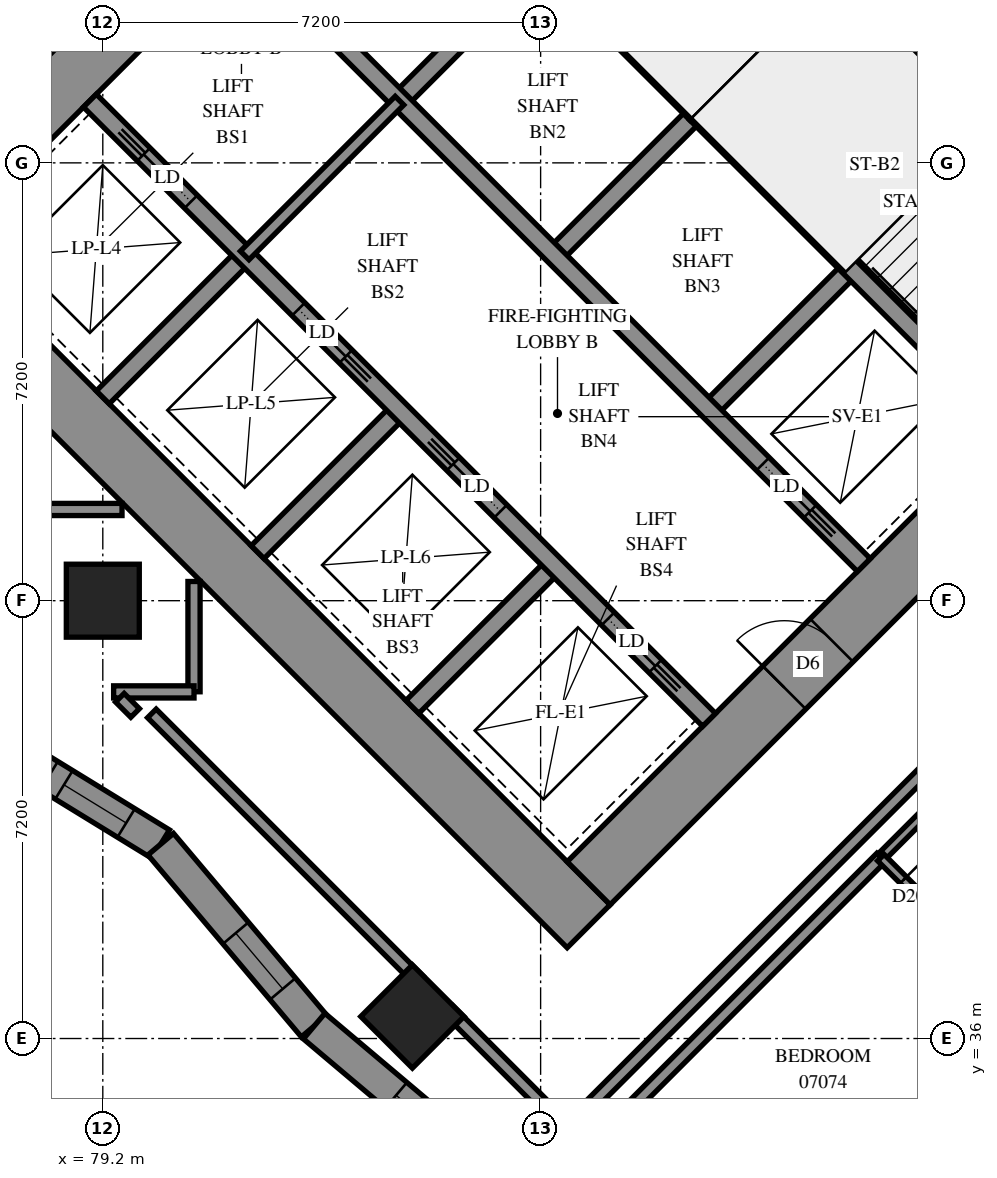
"""IFC4 building model, lengths in metres.
Left out: names, types, materials, properties, quantities, classifications, styles, units other than length and angle.
Written with IfcOpenShell. Run it as: python <this file> out.ifc"""

import sys

from ifc_helpers import new_model, si_unit, direction, frame, frame_2d, origin, origin_2d, place, context, subcontext, project, spatial, polyline, rectangle, outline, extrude, element, fill, save


model = new_model("IFC4")
c1 = context("Model", 3, precision=1e-05, world=origin(), true_north=direction((0.0, 1.0)))
c2 = subcontext(c1, "Body", "Model", "MODEL_VIEW")
j1 = project(units=[si_unit("LENGTHUNIT", "METRE"), si_unit("PLANEANGLEUNIT", "RADIAN")], contexts=[c1])
p1 = place(None, origin())
s1 = spatial("IfcSite", under=j1, at=p1, CompositionType="ELEMENT")
p2 = place(p1, origin())
s2 = spatial("IfcBuilding", under=s1, at=p2, CompositionType="ELEMENT")
p3 = place(p2, frame((0.0, 0.0, 30.4)))
s3 = spatial("IfcBuildingStorey", under=s2, at=p3, CompositionType="ELEMENT", Elevation=30.4)
for number, where, z_axis, x_axis in (
    (1, (79.2, 43.2, 0.0), (0.0, 0.0, 1.0), (1.0, 0.0, 0.0)),
    (2, (84.291, 36.362, 0.0), (0.0, 0.0, 1.0), (0.707, -0.707, 0.0)),
):
    element("IfcColumn", number, at=place(p3, frame(where, z_axis=z_axis, x_axis=x_axis)), inside=s3, PredefinedType="COLUMN", context=c2, shape_type="SweptSolid", body=[
        extrude(rectangle(XDim=1.2, YDim=1.2, at=origin_2d()), origin(), (0.0, 0.0, 1.0), 3.1),
    ])
p4 = place(p3, frame((75.594, 49.443, -0.3), z_axis=(0.0, 0.0, 1.0), x_axis=(0.7071037324, -0.70710983, 0.0)))
e3 = element("IfcWall", 3, at=p4, inside=s3, PredefinedType="SHEAR", context=c2, shape_type="SweptSolid", body=[
    extrude(rectangle(XDim=16.4, YDim=1.0, at=frame_2d((8.2, 0.0))), origin(), (0.0, 0.0, 1.0), 2.7),
])
p5 = place(p3, frame((86.483, 60.333, -0.3), z_axis=(0.0, 0.0, 1.0), x_axis=(0.70710983, -0.7071037324, 0.0)))
e4 = element("IfcWall", 4, at=p5, inside=s3, PredefinedType="SHEAR", context=c2, shape_type="SweptSolid", body=[
    extrude(rectangle(XDim=16.4, YDim=1.0, at=frame_2d((8.2, 0.0))), origin(), (0.0, 0.0, 1.0), 2.7),
])
p6 = place(p5, frame((11.0, 0.0, 0.3)))
e5 = element("IfcOpeningElement", 5, at=p6, cuts=e4, PredefinedType="OPENING", context=c2, shape_type="SweptSolid", body=[
    extrude(rectangle(XDim=0.8, YDim=2.1, at=frame_2d((0.4, 1.05))), frame((0.0, 0.51, 0.0), z_axis=(0.0, -1.0, 0.0), x_axis=(1.0, 0.0, 0.0)), (0.0, 0.0, 1.0), 1.02),
])
p7 = place(p3, frame((76.301, 49.443, -0.3), z_axis=(0.0, 0.0, 1.0), x_axis=(0.7071067812, 0.7071067812, 0.0)))
e6 = element("IfcWall", 6, at=p7, inside=s3, PredefinedType="SHEAR", context=c2, shape_type="SweptSolid", body=[
    extrude(rectangle(XDim=14.4, YDim=1.0, at=frame_2d((7.2, 0.0))), origin(), (0.0, 0.0, 1.0), 2.7),
])
p8 = place(p7, frame((4.55, 0.0, 0.3)))
e7 = element("IfcOpeningElement", 7, at=p8, cuts=e6, PredefinedType="OPENING", context=c2, shape_type="SweptSolid", body=[
    extrude(rectangle(XDim=1.1, YDim=2.1, at=frame_2d((0.55, 1.05))), frame((0.0, 0.51, 0.0), z_axis=(0.0, -1.0, 0.0), x_axis=(1.0, 0.0, 0.0)), (0.0, 0.0, 1.0), 1.02),
])
p9 = place(p7, frame((11.35, 0.0, 0.3)))
e8 = element("IfcOpeningElement", 8, at=p9, cuts=e6, PredefinedType="OPENING", context=c2, shape_type="SweptSolid", body=[
    extrude(rectangle(XDim=1.1, YDim=2.1, at=frame_2d((0.55, 1.05))), frame((0.0, 0.51, 0.0), z_axis=(0.0, -1.0, 0.0), x_axis=(1.0, 0.0, 0.0)), (0.0, 0.0, 1.0), 1.02),
])
p10 = place(p3, frame((87.19, 38.554, -0.3), z_axis=(0.0, 0.0, 1.0), x_axis=(0.707103309, 0.7071102534, 0.0)))
e9 = element("IfcWall", 9, at=p10, inside=s3, PredefinedType="SHEAR", context=c2, shape_type="SweptSolid", body=[
    extrude(rectangle(XDim=14.4, YDim=1.0, at=frame_2d((7.2, 0.0))), origin(), (0.0, 0.0, 1.0), 2.7),
])
p11 = place(p10, frame((4.55, 0.0, 0.3)))
e10 = element("IfcOpeningElement", 10, at=p11, cuts=e9, PredefinedType="OPENING", context=c2, shape_type="SweptSolid", body=[
    extrude(rectangle(XDim=1.1, YDim=2.1, at=frame_2d((0.55, 1.05))), frame((0.0, 0.51, 0.0), z_axis=(0.0, -1.0, 0.0), x_axis=(1.0, 0.0, 0.0)), (0.0, 0.0, 1.0), 1.02),
])
p12 = place(p10, frame((11.35, 0.0, 0.3)))
e11 = element("IfcOpeningElement", 11, at=p12, cuts=e9, PredefinedType="OPENING", context=c2, shape_type="SweptSolid", body=[
    extrude(rectangle(XDim=1.1, YDim=2.1, at=frame_2d((0.55, 1.05))), frame((0.0, 0.51, 0.0), z_axis=(0.0, -1.0, 0.0), x_axis=(1.0, 0.0, 0.0)), (0.0, 0.0, 1.0), 1.02),
])
for number, where, z_axis, x_axis in (
    (12, (79.2, 46.544, 0.0), (0.0, 0.0, 1.0), (0.707, 0.707, 0.0)),
    (13, (84.079, 51.423, 0.0), (0.0, 0.0, 1.0), (0.707, 0.707, 0.0)),
):
    element("IfcWall", number, at=place(p3, frame(where, z_axis=z_axis, x_axis=x_axis)), inside=s3, PredefinedType="SOLIDWALL", context=c2, shape_type="SweptSolid", body=[
        extrude(rectangle(XDim=3.3, YDim=0.3, at=frame_2d((1.65, 0.0))), origin(), (0.0, 0.0, 1.0), 3.1),
    ])
p13 = place(p3, frame((81.746, 43.999, 0.0), z_axis=(0.0, 0.0, 1.0), x_axis=(0.7071067812, 0.7071067812, 0.0)))
e14 = element("IfcWall", 14, at=p13, inside=s3, PredefinedType="SOLIDWALL", context=c2, shape_type="SweptSolid", body=[
    extrude(rectangle(XDim=3.3, YDim=0.3, at=frame_2d((1.65, 0.0))), origin(), (0.0, 0.0, 1.0), 3.1),
])
p14 = place(p3, frame((86.625, 48.878, 0.0), z_axis=(0.0, 0.0, 1.0), x_axis=(0.7071067812, 0.7071067812, 0.0)))
e15 = element("IfcWall", 15, at=p14, inside=s3, PredefinedType="SOLIDWALL", context=c2, shape_type="SweptSolid", body=[
    extrude(rectangle(XDim=3.3, YDim=0.3, at=frame_2d((1.65, 0.0))), origin(), (0.0, 0.0, 1.0), 3.1),
])
p15 = place(p3, frame((84.291, 41.453, 0.0), z_axis=(0.0, 0.0, 1.0), x_axis=(0.7071067812, 0.7071067812, 0.0)))
e16 = element("IfcWall", 16, at=p15, inside=s3, PredefinedType="SOLIDWALL", context=c2, shape_type="SweptSolid", body=[
    extrude(rectangle(XDim=3.3, YDim=0.3, at=frame_2d((1.65, 0.0))), origin(), (0.0, 0.0, 1.0), 3.1),
])
p16 = place(p3, frame((89.17, 46.332, 0.0), z_axis=(0.0, 0.0, 1.0), x_axis=(0.7071067812, 0.7071067812, 0.0)))
e17 = element("IfcWall", 17, at=p16, inside=s3, PredefinedType="SOLIDWALL", context=c2, shape_type="SweptSolid", body=[
    extrude(rectangle(XDim=3.3, YDim=0.3, at=frame_2d((1.65, 0.0))), origin(), (0.0, 0.0, 1.0), 3.1),
])
p17 = place(p3, frame((78.988, 51.423, 0.0), z_axis=(0.0, 0.0, 1.0), x_axis=(0.7071067812, -0.7071067812, 0.0)))
e18 = element("IfcWall", 18, at=p17, inside=s3, PredefinedType="SOLIDWALL", context=c2, shape_type="SweptSolid", body=[
    extrude(rectangle(XDim=14.4, YDim=0.3, at=frame_2d((7.2, 0.0))), origin(), (0.0, 0.0, 1.0), 3.1),
])
p18 = place(p17, frame((1.25, 0.0, 0.0)))
e19 = element("IfcOpeningElement", 19, at=p18, cuts=e18, PredefinedType="OPENING", context=c2, shape_type="SweptSolid", body=[
    extrude(rectangle(XDim=1.1, YDim=2.1, at=frame_2d((0.55, 1.05))), frame((0.0, 0.16, 0.0), z_axis=(0.0, -1.0, 0.0), x_axis=(1.0, 0.0, 0.0)), (0.0, 0.0, 1.0), 0.32),
])
p19 = place(p17, frame((4.85, 0.0, 0.0)))
e20 = element("IfcOpeningElement", 20, at=p19, cuts=e18, PredefinedType="OPENING", context=c2, shape_type="SweptSolid", body=[
    extrude(rectangle(XDim=1.1, YDim=2.1, at=frame_2d((0.55, 1.05))), frame((0.0, 0.16, 0.0), z_axis=(0.0, -1.0, 0.0), x_axis=(1.0, 0.0, 0.0)), (0.0, 0.0, 1.0), 0.32),
])
p20 = place(p17, frame((8.45, 0.0, 0.0)))
e21 = element("IfcOpeningElement", 21, at=p20, cuts=e18, PredefinedType="OPENING", context=c2, shape_type="SweptSolid", body=[
    extrude(rectangle(XDim=1.1, YDim=2.1, at=frame_2d((0.55, 1.05))), frame((0.0, 0.16, 0.0), z_axis=(0.0, -1.0, 0.0), x_axis=(1.0, 0.0, 0.0)), (0.0, 0.0, 1.0), 0.32),
])
p21 = place(p17, frame((12.05, 0.0, 0.0)))
e22 = element("IfcOpeningElement", 22, at=p21, cuts=e18, PredefinedType="OPENING", context=c2, shape_type="SweptSolid", body=[
    extrude(rectangle(XDim=1.1, YDim=2.1, at=frame_2d((0.55, 1.05))), frame((0.0, 0.16, 0.0), z_axis=(0.0, -1.0, 0.0), x_axis=(1.0, 0.0, 0.0)), (0.0, 0.0, 1.0), 0.32),
])
p22 = place(p3, frame((81.534, 53.969, 0.0), z_axis=(0.0, 0.0, 1.0), x_axis=(0.707103309, -0.7071102534, 0.0)))
e23 = element("IfcWall", 23, at=p22, inside=s3, PredefinedType="SOLIDWALL", context=c2, shape_type="SweptSolid", body=[
    extrude(rectangle(XDim=14.4, YDim=0.3, at=frame_2d((7.2, 0.0))), origin(), (0.0, 0.0, 1.0), 3.1),
])
p23 = place(p22, frame((12.05, 0.0, 0.0)))
e24 = element("IfcOpeningElement", 24, at=p23, cuts=e23, PredefinedType="OPENING", context=c2, shape_type="SweptSolid", body=[
    extrude(rectangle(XDim=1.1, YDim=2.1, at=frame_2d((0.55, 1.05))), frame((0.0, 0.16, 0.0), z_axis=(0.0, -1.0, 0.0), x_axis=(1.0, 0.0, 0.0)), (0.0, 0.0, 1.0), 0.32),
])
for number, where, z_axis, x_axis in (
    (25, (83.867, 56.302, 0.0), (0.0, 0.0, 1.0), (0.707, -0.707, 0.0)),
    (26, (88.958, 51.211, 0.0), (0.0, 0.0, 1.0), (0.707, -0.707, 0.0)),
):
    element("IfcWall", number, at=place(p3, frame(where, z_axis=z_axis, x_axis=x_axis)), inside=s3, PredefinedType="SOLIDWALL", context=c2, shape_type="SweptSolid", body=[
        extrude(rectangle(XDim=7.2, YDim=0.3, at=frame_2d((3.6, 0.0))), origin(), (0.0, 0.0, 1.0), 3.1),
    ])
p24 = place(p3, frame((88.958, 51.211, 0.0), z_axis=(0.0, 0.0, 1.0), x_axis=(0.7071067812, 0.7071067812, 0.0)))
e27 = element("IfcWall", 27, at=p24, inside=s3, PredefinedType="SOLIDWALL", context=c2, shape_type="SweptSolid", body=[
    extrude(rectangle(XDim=4.2, YDim=0.3, at=frame_2d((2.1, 0.0))), origin(), (0.0, 0.0, 1.0), 3.1),
])
p25 = place(p3, frame((76.681, 41.325, 0.0), z_axis=(0.0, 0.0, 1.0), x_axis=(0.852496072, -0.5227336293, 0.0)))
e28 = element("IfcWall", 28, at=p25, inside=s3, PredefinedType="SOLIDWALL", context=c2, shape_type="SweptSolid", body=[
    extrude(outline(polyline([(0.039, -0.275), (4.028, -0.275), (4.117, 0.275), (-0.039, 0.275), (0.039, -0.275)])), origin(), (0.0, 0.0, 1.0), 3.1),
])
p26 = place(p25, frame((0.719, 0.0, 0.5)))
e29 = element("IfcOpeningElement", 29, at=p26, cuts=e28, PredefinedType="OPENING", context=c2, shape_type="SweptSolid", body=[
    extrude(rectangle(XDim=1.2, YDim=2.45, at=frame_2d((0.6, 1.225))), frame((0.0, 0.285, 0.0), z_axis=(0.0, -1.0, 0.0), x_axis=(1.0, 0.0, 0.0)), (0.0, 0.0, 1.0), 0.57),
])
p27 = place(p25, frame((2.206, 0.0, 0.5)))
e30 = element("IfcOpeningElement", 30, at=p27, cuts=e28, PredefinedType="OPENING", context=c2, shape_type="SweptSolid", body=[
    extrude(rectangle(XDim=1.2, YDim=2.45, at=frame_2d((0.6, 1.225))), frame((0.0, 0.285, 0.0), z_axis=(0.0, -1.0, 0.0), x_axis=(1.0, 0.0, 0.0)), (0.0, 0.0, 1.0), 0.57),
])
p28 = place(p3, frame((80.153, 39.196, 0.0), z_axis=(0.0, 0.0, 1.0), x_axis=(0.6446069156, -0.7645141753, 0.0)))
e31 = element("IfcWall", 31, at=p28, inside=s3, PredefinedType="SOLIDWALL", context=c2, shape_type="SweptSolid", body=[
    extrude(outline(polyline([(0.044, -0.275), (3.937, -0.275), (3.89, 0.275), (-0.044, 0.275), (0.044, -0.275)])), origin(), (0.0, 0.0, 1.0), 3.1),
])
p29 = place(p28, frame((1.913, 0.0, 0.5)))
e32 = element("IfcOpeningElement", 32, at=p29, cuts=e31, PredefinedType="OPENING", context=c2, shape_type="SweptSolid", body=[
    extrude(rectangle(XDim=1.2, YDim=2.45, at=frame_2d((0.6, 1.225))), frame((0.0, 0.285, 0.0), z_axis=(0.0, -1.0, 0.0), x_axis=(1.0, 0.0, 0.0)), (0.0, 0.0, 1.0), 0.57),
])
p30 = place(p3, frame((82.676, 36.204, 0.0), z_axis=(0.0, 0.0, 1.0), x_axis=(0.7645046987, -0.6446181549, 0.0)))
e33 = element("IfcWall", 33, at=p30, inside=s3, PredefinedType="SOLIDWALL", context=c2, shape_type="SweptSolid", body=[
    extrude(outline(polyline([(-0.023, -0.275), (3.869, -0.275), (3.916, 0.275), (0.023, 0.275), (-0.023, -0.275)])), origin(), (0.0, 0.0, 1.0), 3.1),
])
p31 = place(p30, frame((1.764, 0.0, 0.5)))
e34 = element("IfcOpeningElement", 34, at=p31, cuts=e33, PredefinedType="OPENING", context=c2, shape_type="SweptSolid", body=[
    extrude(rectangle(XDim=1.2, YDim=2.45, at=frame_2d((0.6, 1.225))), frame((0.0, 0.285, 0.0), z_axis=(0.0, -1.0, 0.0), x_axis=(1.0, 0.0, 0.0)), (0.0, 0.0, 1.0), 0.57),
])
p32 = place(p3, frame((91.313, 53.354, 0.0), z_axis=(0.0, 0.0, 1.0), x_axis=(0.7071067812, -0.7071067812, 0.0)))
e35 = element("IfcWall", 35, at=p32, inside=s3, PredefinedType="PARTITIONING", context=c2, shape_type="SweptSolid", body=[
    extrude(rectangle(XDim=5.65, YDim=0.15, at=frame_2d((2.825, 0.0))), origin(), (0.0, 0.0, 1.0), 3.1),
])
p33 = place(p3, frame((81.534, 48.878, 0.0), z_axis=(0.0, 0.0, 1.0), x_axis=(0.707092892, 0.7071206701, 0.0)))
e36 = element("IfcWall", 36, at=p33, inside=s3, PredefinedType="PARTITIONING", context=c2, shape_type="SweptSolid", body=[
    extrude(rectangle(XDim=3.6, YDim=0.2, at=frame_2d((1.8, 0.0))), origin(), (0.0, 0.0, 1.0), 3.1),
])
p34 = place(p3, frame((86.838, 34.522, 0.0), z_axis=(0.0, 0.0, 1.0), x_axis=(0.7072154749, 0.7069980708, 0.0)))
e37 = element("IfcWall", 37, at=p34, inside=s3, PredefinedType="PARTITIONING", context=c2, shape_type="SweptSolid", body=[
    extrude(rectangle(XDim=9.2, YDim=0.2, at=frame_2d((4.6, 0.0))), origin(), (0.0, 0.0, 1.0), 3.1),
])
p35 = place(p3, frame((86.336, 33.31, 0.0), z_axis=(0.0, 0.0, 1.0), x_axis=(0.7069819543, 0.707231586, 0.0)))
e38 = element("IfcWall", 38, at=p35, inside=s3, PredefinedType="PARTITIONING", context=c2, shape_type="SweptSolid", body=[
    extrude(rectangle(XDim=8.012, YDim=0.2, at=frame_2d((4.006, 0.0))), origin(), (0.0, 0.0, 1.0), 3.1),
])
p36 = place(p3, frame((80.007, 41.347, 0.0), z_axis=(0.0, 0.0, 1.0), x_axis=(0.7071067812, -0.7071067812, 0.0)))
e39 = element("IfcWall", 39, at=p36, inside=s3, PredefinedType="PARTITIONING", context=c2, shape_type="SweptSolid", body=[
    extrude(rectangle(XDim=6.206, YDim=0.2, at=frame_2d((3.103, 0.0))), origin(), (0.0, 0.0, 1.0), 3.1),
])
p37 = place(p3, frame((89.981, 31.871, 0.0), z_axis=(0.0, 0.0, 1.0), x_axis=(0.7071067812, 0.7071067812, 0.0)))
e40 = element("IfcWall", 40, at=p37, inside=s3, PredefinedType="PARTITIONING", context=c2, shape_type="SweptSolid", body=[
    extrude(rectangle(XDim=5.504, YDim=0.2, at=frame_2d((2.752, 0.0))), origin(), (0.0, 0.0, 1.0), 3.1),
])
p38 = place(p3, frame((84.889, 36.465, 0.0), z_axis=(0.0, 0.0, 1.0), x_axis=(0.7071067812, -0.7071067812, 0.0)))
e41 = element("IfcWall", 41, at=p38, inside=s3, PredefinedType="PARTITIONING", context=c2, shape_type="SweptSolid", body=[
    extrude(rectangle(XDim=2.749, YDim=0.2, at=frame_2d((1.375, 0.0))), origin(), (0.0, 0.0, 1.0), 3.1),
])
p39 = place(p3, frame((91.997, 38.979, 0.0), z_axis=(0.0, 0.0, 1.0), x_axis=(0.7071067812, 0.7071067812, 0.0)))
e42 = element("IfcWall", 42, at=p39, inside=s3, PredefinedType="PARTITIONING", context=c2, shape_type="SweptSolid", body=[
    extrude(rectangle(XDim=2.401, YDim=0.15, at=frame_2d((1.201, 0.0))), origin(), (0.0, 0.0, 1.0), 3.1),
])
p40 = place(p3, frame((91.995, 38.975, 0.0), z_axis=(0.0, 0.0, 1.0), x_axis=(0.7071067812, -0.7071067812, 0.0)))
e43 = element("IfcWall", 43, at=p40, inside=s3, PredefinedType="PARTITIONING", context=c2, shape_type="SweptSolid", body=[
    extrude(rectangle(XDim=1.901, YDim=0.15, at=frame_2d((0.95, 0.0))), origin(), (0.0, 0.0, 1.0), 3.1),
])
p41 = place(p40, frame((0.523, 0.0, 0.0)))
e44 = element("IfcOpeningElement", 44, at=p41, cuts=e43, PredefinedType="OPENING", context=c2, shape_type="SweptSolid", body=[
    extrude(rectangle(XDim=0.8, YDim=2.1, at=frame_2d((0.4, 1.05))), frame((0.0, 0.085, 0.0), z_axis=(0.0, -1.0, 0.0), x_axis=(1.0, 0.0, 0.0)), (0.0, 0.0, 1.0), 0.17),
])
for number, where, z_axis, x_axis in (
    (45, (77.702, 44.7, 0.0), (0.0, 0.0, 1.0), (1.0, 0.0, 0.0)),
    (46, (80.7, 41.702, 0.0), (0.0, 0.0, 1.0), (0.0, 1.0, 0.0)),
):
    element("IfcWall", number, at=place(p3, frame(where, z_axis=z_axis, x_axis=x_axis)), inside=s3, PredefinedType="PARTITIONING", context=c2, shape_type="SweptSolid", body=[
        extrude(rectangle(XDim=1.814, YDim=0.2, at=frame_2d((0.907, 0.0))), origin(), (0.0, 0.0, 1.0), 3.1),
    ])
p42 = place(p3, frame((79.378, 41.7, 0.0), z_axis=(0.0, 0.0, 1.0), x_axis=(1.0, 0.0, 0.0)))
e47 = element("IfcWall", 47, at=p42, inside=s3, PredefinedType="PARTITIONING", context=c2, shape_type="SweptSolid", body=[
    extrude(rectangle(XDim=1.322, YDim=0.2, at=frame_2d((0.661, 0.0))), origin(), (0.0, 0.0, 1.0), 3.1),
])
p43 = place(p3, frame((79.481, 41.605, 0.0), z_axis=(0.0, 0.0, 1.0), x_axis=(0.7071067812, -0.7071067812, 0.0)))
e48 = element("IfcWall", 48, at=p43, inside=s3, PredefinedType="PARTITIONING", context=c2, shape_type="SweptSolid", body=[
    extrude(rectangle(XDim=0.355, YDim=0.2, at=frame_2d((0.177, 0.0))), origin(), (0.0, 0.0, 1.0), 3.1),
])
p44 = place(p26, origin())
e49 = element("IfcWindow", 49, at=p44, inside=s3, PartitioningType="SINGLE_PANEL", PredefinedType="WINDOW", context=c2, shape_type="SweptSolid", body=[
    extrude(rectangle(XDim=1.2, YDim=2.45, at=frame_2d((0.6, 1.225))), frame((0.0, 0.155, 0.0), z_axis=(0.0, -1.0, 0.0), x_axis=(1.0, 0.0, 0.0)), (0.0, 0.0, 1.0), 0.06),
])
fill(e29, e49)
p45 = place(p27, origin())
e50 = element("IfcWindow", 50, at=p45, inside=s3, PartitioningType="SINGLE_PANEL", PredefinedType="WINDOW", context=c2, shape_type="SweptSolid", body=[
    extrude(rectangle(XDim=1.2, YDim=2.45, at=frame_2d((0.6, 1.225))), frame((0.0, 0.155, 0.0), z_axis=(0.0, -1.0, 0.0), x_axis=(1.0, 0.0, 0.0)), (0.0, 0.0, 1.0), 0.06),
])
fill(e30, e50)
p46 = place(p29, origin())
e51 = element("IfcWindow", 51, at=p46, inside=s3, PartitioningType="SINGLE_PANEL", PredefinedType="WINDOW", context=c2, shape_type="SweptSolid", body=[
    extrude(rectangle(XDim=1.2, YDim=2.45, at=frame_2d((0.6, 1.225))), frame((0.0, 0.155, 0.0), z_axis=(0.0, -1.0, 0.0), x_axis=(1.0, 0.0, 0.0)), (0.0, 0.0, 1.0), 0.06),
])
fill(e32, e51)
p47 = place(p31, origin())
e52 = element("IfcWindow", 52, at=p47, inside=s3, PartitioningType="SINGLE_PANEL", PredefinedType="WINDOW", context=c2, shape_type="SweptSolid", body=[
    extrude(rectangle(XDim=1.2, YDim=2.45, at=frame_2d((0.6, 1.225))), frame((0.0, 0.155, 0.0), z_axis=(0.0, -1.0, 0.0), x_axis=(1.0, 0.0, 0.0)), (0.0, 0.0, 1.0), 0.06),
])
fill(e34, e52)
p48 = place(p11, origin())
e53 = element("IfcDoor", 53, at=p48, inside=s3, OperationType="DOUBLE_DOOR_SINGLE_SWING", PredefinedType="DOOR", context=c2, shape_type="SweptSolid", body=[
    extrude(rectangle(XDim=1.1, YDim=2.1, at=frame_2d((0.55, 1.05))), frame((0.0, 0.025, 0.0), z_axis=(0.0, -1.0, 0.0), x_axis=(1.0, 0.0, 0.0)), (0.0, 0.0, 1.0), 0.05),
])
fill(e10, e53)
p49 = place(p18, origin())
e54 = element("IfcDoor", 54, at=p49, inside=s3, OperationType="SLIDING_TO_LEFT", PredefinedType="DOOR", context=c2, shape_type="SweptSolid", body=[
    extrude(rectangle(XDim=1.1, YDim=2.1, at=frame_2d((0.55, 1.05))), frame((0.0, 0.025, 0.0), z_axis=(0.0, -1.0, 0.0), x_axis=(1.0, 0.0, 0.0)), (0.0, 0.0, 1.0), 0.05),
])
fill(e19, e54)
p50 = place(p19, origin())
e55 = element("IfcDoor", 55, at=p50, inside=s3, OperationType="SLIDING_TO_RIGHT", PredefinedType="DOOR", context=c2, shape_type="SweptSolid", body=[
    extrude(rectangle(XDim=1.1, YDim=2.1, at=frame_2d((0.55, 1.05))), frame((0.0, 0.025, 0.0), z_axis=(0.0, -1.0, 0.0), x_axis=(1.0, 0.0, 0.0)), (0.0, 0.0, 1.0), 0.05),
])
fill(e20, e55)
p51 = place(p20, origin())
e56 = element("IfcDoor", 56, at=p51, inside=s3, OperationType="SLIDING_TO_LEFT", PredefinedType="DOOR", context=c2, shape_type="SweptSolid", body=[
    extrude(rectangle(XDim=1.1, YDim=2.1, at=frame_2d((0.55, 1.05))), frame((0.0, 0.025, 0.0), z_axis=(0.0, -1.0, 0.0), x_axis=(1.0, 0.0, 0.0)), (0.0, 0.0, 1.0), 0.05),
])
fill(e21, e56)
p52 = place(p21, origin())
e57 = element("IfcDoor", 57, at=p52, inside=s3, OperationType="SLIDING_TO_RIGHT", PredefinedType="DOOR", context=c2, shape_type="SweptSolid", body=[
    extrude(rectangle(XDim=1.1, YDim=2.1, at=frame_2d((0.55, 1.05))), frame((0.0, 0.025, 0.0), z_axis=(0.0, -1.0, 0.0), x_axis=(1.0, 0.0, 0.0)), (0.0, 0.0, 1.0), 0.05),
])
fill(e22, e57)
p53 = place(p23, origin())
e58 = element("IfcDoor", 58, at=p53, inside=s3, OperationType="SLIDING_TO_RIGHT", PredefinedType="DOOR", context=c2, shape_type="SweptSolid", body=[
    extrude(rectangle(XDim=1.1, YDim=2.1, at=frame_2d((0.55, 1.05))), frame((0.0, 0.025, 0.0), z_axis=(0.0, -1.0, 0.0), x_axis=(1.0, 0.0, 0.0)), (0.0, 0.0, 1.0), 0.05),
])
fill(e24, e58)
p54 = place(p41, origin())
e59 = element("IfcDoor", 59, at=p54, inside=s3, OperationType="SINGLE_SWING_RIGHT", PredefinedType="DOOR", context=c2, shape_type="SweptSolid", body=[
    extrude(rectangle(XDim=0.8, YDim=2.1, at=frame_2d((0.4, 1.05))), frame((0.0, 0.025, 0.0), z_axis=(0.0, -1.0, 0.0), x_axis=(1.0, 0.0, 0.0)), (0.0, 0.0, 1.0), 0.05),
])
fill(e44, e59)
save(model, sys.argv[1])
